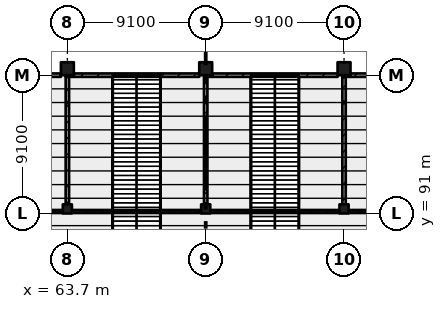
"""IFC4 building model, lengths in metres.
Left out: names, types, materials, properties, quantities, classifications, styles, units other than length and angle.
Written with IfcOpenShell. Run it as: python <this file> out.ifc"""

import sys

from ifc_helpers import new_model, si_unit, direction, frame, frame_2d, origin, origin_2d, place, context, subcontext, project, spatial, rectangle, extrude, element, fill, save


model = new_model("IFC4")
c1 = context("Model", 3, precision=1e-05, world=origin(), true_north=direction((0.0, 1.0)))
c2 = subcontext(c1, "Body", "Model", "MODEL_VIEW")
j1 = project(units=[si_unit("LENGTHUNIT", "METRE"), si_unit("PLANEANGLEUNIT", "RADIAN")], contexts=[c1])
p1 = place(None, origin())
s1 = spatial("IfcSite", under=j1, at=p1, CompositionType="ELEMENT")
p2 = place(p1, origin())
s2 = spatial("IfcBuilding", under=s1, at=p2, CompositionType="ELEMENT")
p3 = place(p2, frame((0.0, 0.0, 15.47)))
s3 = spatial("IfcBuildingStorey", under=s2, at=p3, CompositionType="ELEMENT", Elevation=15.47)
p4 = place(p3, frame((63.7, 91.3, 0.0), z_axis=(0.0, 0.0, 1.0), x_axis=(1.0, 0.0, 0.0)))
e1 = element("IfcColumn", 1, at=p4, inside=s3, PredefinedType="COLUMN", context=c2, shape_type="SweptSolid", body=[
    extrude(rectangle(XDim=0.6, YDim=0.6, at=origin_2d()), origin(), (0.0, 0.0, 1.0), 2.71),
])
p5 = place(p3, frame((63.7, 100.525, 0.0), z_axis=(0.0, 0.0, 1.0), x_axis=(1.0, 0.0, 0.0)))
e2 = element("IfcColumn", 2, at=p5, inside=s3, PredefinedType="COLUMN", context=c2, shape_type="SweptSolid", body=[
    extrude(rectangle(XDim=0.85, YDim=0.85, at=origin_2d()), origin(), (0.0, 0.0, 1.0), 4.55),
])
p6 = place(p3, frame((72.8, 91.3, 0.0), z_axis=(0.0, 0.0, 1.0), x_axis=(1.0, 0.0, 0.0)))
e3 = element("IfcColumn", 3, at=p6, inside=s3, PredefinedType="COLUMN", context=c2, shape_type="SweptSolid", body=[
    extrude(rectangle(XDim=0.6, YDim=0.6, at=origin_2d()), origin(), (0.0, 0.0, 1.0), 2.71),
])
p7 = place(p3, frame((72.8, 100.525, 0.0), z_axis=(0.0, 0.0, 1.0), x_axis=(1.0, 0.0, 0.0)))
e4 = element("IfcColumn", 4, at=p7, inside=s3, PredefinedType="COLUMN", context=c2, shape_type="SweptSolid", body=[
    extrude(rectangle(XDim=0.85, YDim=0.85, at=origin_2d()), origin(), (0.0, 0.0, 1.0), 4.55),
])
p8 = place(p3, frame((81.9, 91.3, 0.0), z_axis=(0.0, 0.0, 1.0), x_axis=(1.0, 0.0, 0.0)))
e5 = element("IfcColumn", 5, at=p8, inside=s3, PredefinedType="COLUMN", context=c2, shape_type="SweptSolid", body=[
    extrude(rectangle(XDim=0.6, YDim=0.6, at=origin_2d()), origin(), (0.0, 0.0, 1.0), 2.71),
])
p9 = place(p3, frame((81.9, 100.525, 0.0), z_axis=(0.0, 0.0, 1.0), x_axis=(1.0, 0.0, 0.0)))
e6 = element("IfcColumn", 6, at=p9, inside=s3, PredefinedType="COLUMN", context=c2, shape_type="SweptSolid", body=[
    extrude(rectangle(XDim=0.85, YDim=0.85, at=origin_2d()), origin(), (0.0, 0.0, 1.0), 4.55),
])
p10 = place(p3, frame((63.275, 100.1, 0.0), z_axis=(0.0, 0.0, 1.0), x_axis=(-1.0, 0.0, 0.0)))
e7 = element("IfcWall", 7, at=p10, inside=s3, PredefinedType="PARTITIONING", context=c2, shape_type="SweptSolid", body=[
    extrude(rectangle(XDim=8.25, YDim=0.225, at=frame_2d((4.125, 0.0))), origin(), (0.0, 0.0, 1.0), 3.6),
])
p11 = place(p10, frame((3.65, 0.0, 0.0)))
e8 = element("IfcOpeningElement", 8, at=p11, cuts=e7, PredefinedType="OPENING", context=c2, shape_type="SweptSolid", body=[
    extrude(rectangle(XDim=1.0, YDim=2.4, at=frame_2d((0.5, 1.2))), frame((0.0, 0.123, 0.0), z_axis=(0.0, -1.0, 0.0), x_axis=(1.0, 0.0, 0.0)), (0.0, 0.0, 1.0), 0.245),
])
p12 = place(p3, frame((63.7, 98.27, 0.0), z_axis=(0.0, 0.0, 1.0), x_axis=(0.0, -1.0, 0.0)))
e9 = element("IfcWall", 9, at=p12, inside=s3, PredefinedType="PARTITIONING", context=c2, shape_type="SweptSolid", body=[
    extrude(rectangle(XDim=6.67, YDim=0.225, at=frame_2d((3.335, 0.0))), origin(), (0.0, 0.0, 1.0), 3.22),
])
p13 = place(p3, frame((63.7, 99.988, 0.0), z_axis=(0.0, 0.0, 1.0), x_axis=(0.0, -1.0, 0.0)))
e10 = element("IfcWall", 10, at=p13, inside=s3, PredefinedType="PARTITIONING", context=c2, shape_type="SweptSolid", body=[
    extrude(rectangle(XDim=1.657, YDim=0.225, at=frame_2d((0.829, 0.0))), origin(), (0.0, 0.0, 1.0), 3.22),
])
p14 = place(p3, frame((64.125, 100.1, 0.0), z_axis=(0.0, 0.0, 1.0), x_axis=(-1.0, 0.0, 0.0)))
e11 = element("IfcWall", 11, at=p14, inside=s3, PredefinedType="PARTITIONING", context=c2, shape_type="SweptSolid", body=[
    extrude(rectangle(XDim=0.538, YDim=0.225, at=frame_2d((0.269, 0.0))), origin(), (0.0, 0.0, 1.0), 3.22),
])
p15 = place(p3, frame((72.375, 100.1, 0.0), z_axis=(0.0, 0.0, 1.0), x_axis=(-1.0, 0.0, 0.0)))
e12 = element("IfcWall", 12, at=p15, inside=s3, PredefinedType="PARTITIONING", context=c2, shape_type="SweptSolid", body=[
    extrude(rectangle(XDim=8.25, YDim=0.225, at=frame_2d((4.125, 0.0))), origin(), (0.0, 0.0, 1.0), 3.6),
])
p16 = place(p15, frame((3.65, 0.0, 0.0)))
e13 = element("IfcOpeningElement", 13, at=p16, cuts=e12, PredefinedType="OPENING", context=c2, shape_type="SweptSolid", body=[
    extrude(rectangle(XDim=1.0, YDim=2.4, at=frame_2d((0.5, 1.2))), frame((0.0, 0.123, 0.0), z_axis=(0.0, -1.0, 0.0), x_axis=(1.0, 0.0, 0.0)), (0.0, 0.0, 1.0), 0.245),
])
p17 = place(p3, frame((72.8, 98.27, 0.0), z_axis=(0.0, 0.0, 1.0), x_axis=(0.0, -1.0, 0.0)))
e14 = element("IfcWall", 14, at=p17, inside=s3, PredefinedType="PARTITIONING", context=c2, shape_type="SweptSolid", body=[
    extrude(rectangle(XDim=6.67, YDim=0.225, at=frame_2d((3.335, 0.0))), origin(), (0.0, 0.0, 1.0), 3.22),
])
p18 = place(p3, frame((72.8, 99.988, 0.0), z_axis=(0.0, 0.0, 1.0), x_axis=(0.0, -1.0, 0.0)))
e15 = element("IfcWall", 15, at=p18, inside=s3, PredefinedType="PARTITIONING", context=c2, shape_type="SweptSolid", body=[
    extrude(rectangle(XDim=1.657, YDim=0.225, at=frame_2d((0.829, 0.0))), origin(), (0.0, 0.0, 1.0), 3.22),
])
p19 = place(p3, frame((73.225, 100.1, 0.0), z_axis=(0.0, 0.0, 1.0), x_axis=(-1.0, 0.0, 0.0)))
e16 = element("IfcWall", 16, at=p19, inside=s3, PredefinedType="PARTITIONING", context=c2, shape_type="SweptSolid", body=[
    extrude(rectangle(XDim=0.538, YDim=0.225, at=frame_2d((0.269, 0.0))), origin(), (0.0, 0.0, 1.0), 3.22),
])
p20 = place(p3, frame((81.475, 100.1, 0.0), z_axis=(0.0, 0.0, 1.0), x_axis=(-1.0, 0.0, 0.0)))
e17 = element("IfcWall", 17, at=p20, inside=s3, PredefinedType="PARTITIONING", context=c2, shape_type="SweptSolid", body=[
    extrude(rectangle(XDim=8.25, YDim=0.225, at=frame_2d((4.125, 0.0))), origin(), (0.0, 0.0, 1.0), 3.6),
])
p21 = place(p20, frame((3.65, 0.0, 0.0)))
e18 = element("IfcOpeningElement", 18, at=p21, cuts=e17, PredefinedType="OPENING", context=c2, shape_type="SweptSolid", body=[
    extrude(rectangle(XDim=1.0, YDim=2.4, at=frame_2d((0.5, 1.2))), frame((0.0, 0.123, 0.0), z_axis=(0.0, -1.0, 0.0), x_axis=(1.0, 0.0, 0.0)), (0.0, 0.0, 1.0), 0.245),
])
p22 = place(p3, frame((81.9, 98.27, 0.0), z_axis=(0.0, 0.0, 1.0), x_axis=(0.0, -1.0, 0.0)))
e19 = element("IfcWall", 19, at=p22, inside=s3, PredefinedType="PARTITIONING", context=c2, shape_type="SweptSolid", body=[
    extrude(rectangle(XDim=6.67, YDim=0.225, at=frame_2d((3.335, 0.0))), origin(), (0.0, 0.0, 1.0), 3.22),
])
p23 = place(p3, frame((81.9, 99.988, 0.0), z_axis=(0.0, 0.0, 1.0), x_axis=(0.0, -1.0, 0.0)))
e20 = element("IfcWall", 20, at=p23, inside=s3, PredefinedType="PARTITIONING", context=c2, shape_type="SweptSolid", body=[
    extrude(rectangle(XDim=1.657, YDim=0.225, at=frame_2d((0.829, 0.0))), origin(), (0.0, 0.0, 1.0), 3.22),
])
p24 = place(p3, frame((82.325, 100.1, 0.0), z_axis=(0.0, 0.0, 1.0), x_axis=(-1.0, 0.0, 0.0)))
e21 = element("IfcWall", 21, at=p24, inside=s3, PredefinedType="PARTITIONING", context=c2, shape_type="SweptSolid", body=[
    extrude(rectangle(XDim=0.537, YDim=0.225, at=frame_2d((0.269, 0.0))), origin(), (0.0, 0.0, 1.0), 3.22),
])
p25 = place(p3, frame((90.575, 100.1, 0.0), z_axis=(0.0, 0.0, 1.0), x_axis=(-1.0, 0.0, 0.0)))
e22 = element("IfcWall", 22, at=p25, inside=s3, PredefinedType="PARTITIONING", context=c2, shape_type="SweptSolid", body=[
    extrude(rectangle(XDim=8.25, YDim=0.225, at=frame_2d((4.125, 0.0))), origin(), (0.0, 0.0, 1.0), 3.6),
])
p26 = place(p25, frame((3.65, 0.0, 0.0)))
e23 = element("IfcOpeningElement", 23, at=p26, cuts=e22, PredefinedType="OPENING", context=c2, shape_type="SweptSolid", body=[
    extrude(rectangle(XDim=1.0, YDim=2.4, at=frame_2d((0.5, 1.2))), frame((0.0, 0.123, 0.0), z_axis=(0.0, -1.0, 0.0), x_axis=(1.0, 0.0, 0.0)), (0.0, 0.0, 1.0), 0.245),
])
p27 = place(p3, frame((63.4, 91.13, 0.0), z_axis=(0.0, 0.0, 1.0), x_axis=(-1.0, 0.0, 0.0)))
e24 = element("IfcWall", 24, at=p27, inside=s3, PredefinedType="PARTITIONING", context=c2, shape_type="SweptSolid", body=[
    extrude(rectangle(XDim=8.5, YDim=0.2, at=frame_2d((4.25, 0.0))), origin(), (0.0, 0.0, 1.0), 2.71),
])
p28 = place(p27, frame((1.25, 0.0, 1.1)))
e25 = element("IfcOpeningElement", 25, at=p28, cuts=e24, PredefinedType="OPENING", context=c2, shape_type="SweptSolid", body=[
    extrude(rectangle(XDim=6.0, YDim=1.3, at=frame_2d((3.0, 0.65))), frame((0.0, 0.11, 0.0), z_axis=(0.0, -1.0, 0.0), x_axis=(1.0, 0.0, 0.0)), (0.0, 0.0, 1.0), 0.22),
])
p29 = place(p3, frame((72.5, 91.13, 0.0), z_axis=(0.0, 0.0, 1.0), x_axis=(-1.0, 0.0, 0.0)))
e26 = element("IfcWall", 26, at=p29, inside=s3, PredefinedType="PARTITIONING", context=c2, shape_type="SweptSolid", body=[
    extrude(rectangle(XDim=8.5, YDim=0.2, at=frame_2d((4.25, 0.0))), origin(), (0.0, 0.0, 1.0), 2.71),
])
p30 = place(p29, frame((1.25, 0.0, 1.1)))
e27 = element("IfcOpeningElement", 27, at=p30, cuts=e26, PredefinedType="OPENING", context=c2, shape_type="SweptSolid", body=[
    extrude(rectangle(XDim=6.0, YDim=1.3, at=frame_2d((3.0, 0.65))), frame((0.0, 0.11, 0.0), z_axis=(0.0, -1.0, 0.0), x_axis=(1.0, 0.0, 0.0)), (0.0, 0.0, 1.0), 0.22),
])
p31 = place(p3, frame((81.6, 91.13, 0.0), z_axis=(0.0, 0.0, 1.0), x_axis=(-1.0, 0.0, 0.0)))
e28 = element("IfcWall", 28, at=p31, inside=s3, PredefinedType="PARTITIONING", context=c2, shape_type="SweptSolid", body=[
    extrude(rectangle(XDim=8.5, YDim=0.2, at=frame_2d((4.25, 0.0))), origin(), (0.0, 0.0, 1.0), 2.71),
])
p32 = place(p31, frame((1.25, 0.0, 1.1)))
e29 = element("IfcOpeningElement", 29, at=p32, cuts=e28, PredefinedType="OPENING", context=c2, shape_type="SweptSolid", body=[
    extrude(rectangle(XDim=6.0, YDim=1.3, at=frame_2d((3.0, 0.65))), frame((0.0, 0.11, 0.0), z_axis=(0.0, -1.0, 0.0), x_axis=(1.0, 0.0, 0.0)), (0.0, 0.0, 1.0), 0.22),
])
p33 = place(p3, frame((90.7, 91.13, 0.0), z_axis=(0.0, 0.0, 1.0), x_axis=(-1.0, 0.0, 0.0)))
e30 = element("IfcWall", 30, at=p33, inside=s3, PredefinedType="PARTITIONING", context=c2, shape_type="SweptSolid", body=[
    extrude(rectangle(XDim=8.5, YDim=0.2, at=frame_2d((4.25, 0.0))), origin(), (0.0, 0.0, 1.0), 2.71),
])
p34 = place(p33, frame((1.25, 0.0, 1.1)))
e31 = element("IfcOpeningElement", 31, at=p34, cuts=e30, PredefinedType="OPENING", context=c2, shape_type="SweptSolid", body=[
    extrude(rectangle(XDim=6.0, YDim=1.3, at=frame_2d((3.0, 0.65))), frame((0.0, 0.11, 0.0), z_axis=(0.0, -1.0, 0.0), x_axis=(1.0, 0.0, 0.0)), (0.0, 0.0, 1.0), 0.22),
])
p35 = place(p30, origin())
e32 = element("IfcWindow", 32, at=p35, inside=s3, PartitioningType="SINGLE_PANEL", PredefinedType="WINDOW", context=c2, shape_type="SweptSolid", body=[
    extrude(rectangle(XDim=6.0, YDim=1.3, at=frame_2d((3.0, 0.65))), frame((0.0, 0.03, 0.0), z_axis=(0.0, -1.0, 0.0), x_axis=(1.0, 0.0, 0.0)), (0.0, 0.0, 1.0), 0.06),
])
fill(e27, e32)
p36 = place(p32, origin())
e33 = element("IfcWindow", 33, at=p36, inside=s3, PartitioningType="SINGLE_PANEL", PredefinedType="WINDOW", context=c2, shape_type="SweptSolid", body=[
    extrude(rectangle(XDim=6.0, YDim=1.3, at=frame_2d((3.0, 0.65))), frame((0.0, 0.03, 0.0), z_axis=(0.0, -1.0, 0.0), x_axis=(1.0, 0.0, 0.0)), (0.0, 0.0, 1.0), 0.06),
])
fill(e29, e33)
p37 = place(p16, origin())
e34 = element("IfcDoor", 34, at=p37, inside=s3, OperationType="SINGLE_SWING_LEFT", PredefinedType="DOOR", context=c2, shape_type="SweptSolid", body=[
    extrude(rectangle(XDim=1.0, YDim=2.4, at=frame_2d((0.5, 1.2))), frame((0.0, 0.025, 0.0), z_axis=(0.0, -1.0, 0.0), x_axis=(1.0, 0.0, 0.0)), (0.0, 0.0, 1.0), 0.05),
])
fill(e13, e34)
p38 = place(p21, origin())
e35 = element("IfcDoor", 35, at=p38, inside=s3, OperationType="SINGLE_SWING_LEFT", PredefinedType="DOOR", context=c2, shape_type="SweptSolid", body=[
    extrude(rectangle(XDim=1.0, YDim=2.4, at=frame_2d((0.5, 1.2))), frame((0.0, 0.025, 0.0), z_axis=(0.0, -1.0, 0.0), x_axis=(1.0, 0.0, 0.0)), (0.0, 0.0, 1.0), 0.05),
])
fill(e18, e35)
save(model, sys.argv[1])
